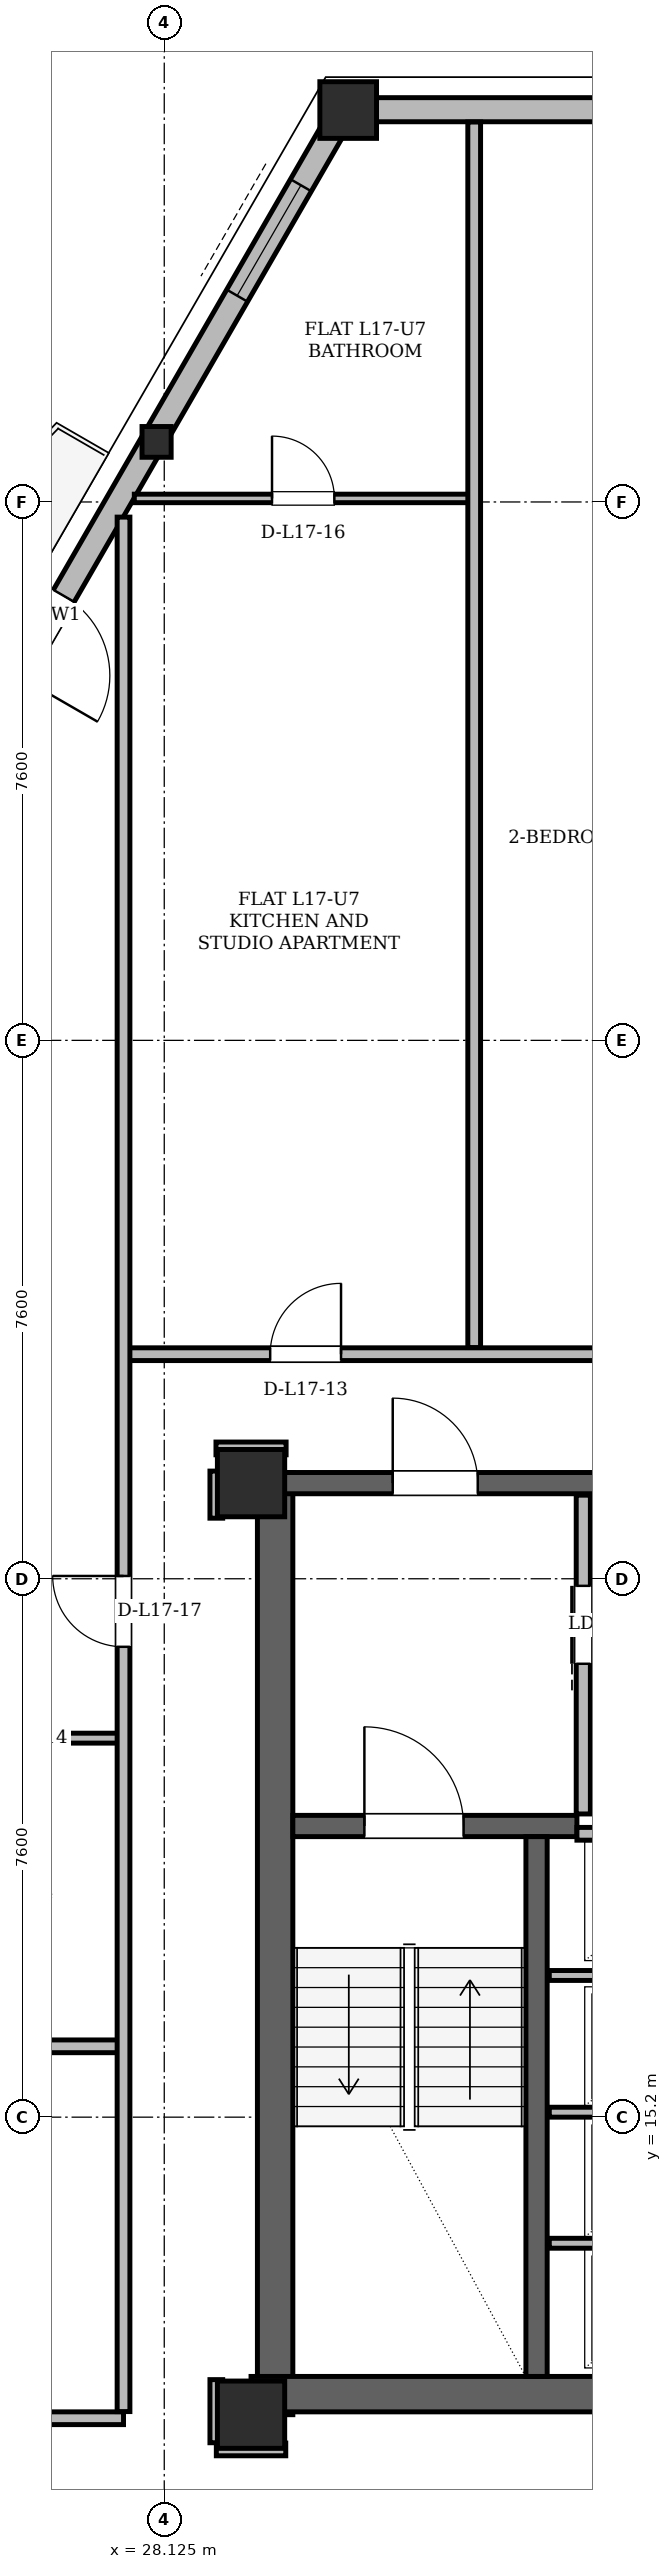
"""IFC4 building model, lengths in metres.
Left out: names, types, materials, properties, quantities, classifications, styles, units other than length and angle.
Written with IfcOpenShell. Run it as: python <this file> out.ifc"""

import sys

from ifc_helpers import new_model, si_unit, direction, frame, frame_2d, origin, origin_2d, place, context, subcontext, project, spatial, rectangle, hollow_rectangle, i_section, extrude, element, fill, save


model = new_model("IFC4")
c1 = context("Model", 3, precision=1e-05, world=origin(), true_north=direction((0.0, 1.0)))
c2 = subcontext(c1, "Body", "Model", "MODEL_VIEW")
j1 = project(units=[si_unit("LENGTHUNIT", "METRE"), si_unit("PLANEANGLEUNIT", "RADIAN")], contexts=[c1])
p1 = place(None, origin())
s1 = spatial("IfcSite", under=j1, at=p1, CompositionType="ELEMENT")
p2 = place(p1, origin())
s2 = spatial("IfcBuilding", under=s1, at=p2, CompositionType="ELEMENT")
p3 = place(p2, frame((0.0, 0.0, 66.9)))
s3 = spatial("IfcBuildingStorey", under=s2, at=p3, CompositionType="ELEMENT", Elevation=66.9)
for number, where, z_axis, x_axis in (
    (1, (29.35, 11.0, 0.0), (0.0, 0.0, 1.0), (1.0, 0.0, 0.0)),
    (2, (29.35, 24.15, 0.0), (0.0, 0.0, 1.0), (1.0, 0.0, 0.0)),
):
    element("IfcColumn", number, at=place(p3, frame(where, z_axis=z_axis, x_axis=x_axis)), inside=s3, PredefinedType="COLUMN", context=c2, shape_type="SweptSolid", body=[
        extrude(hollow_rectangle(XDim=0.95, YDim=0.95, WallThickness=0.08, at=origin_2d()), origin(), (0.0, 0.0, 1.0), 3.6),
    ])
p4 = place(p3, frame((30.669, 43.537, 0.005), z_axis=(0.028949624745, -0.002582360893, 0.999577536082), x_axis=(0.08884909331, 0.996045098687, 0.0)))
e3 = element("IfcColumn", 3, at=p4, inside=s3, PredefinedType="COLUMN", context=c2, shape_type="SweptSolid", body=[
    extrude(hollow_rectangle(XDim=0.8, YDim=0.8, WallThickness=0.065, at=origin_2d()), origin(), (0.0, 0.0, 1.0), 3.593),
])
p5 = place(p3, frame((27.968, 38.859, 0.005), z_axis=(0.026979970064, -0.005980446765, 0.999618084806), x_axis=(0.216409655053, 0.976302648363, 0.0)))
e4 = element("IfcColumn", 4, at=p5, inside=s3, PredefinedType="COLUMN", context=c2, shape_type="SweptSolid", body=[
    extrude(i_section(OverallWidth=0.411, OverallDepth=0.434, WebThickness=0.036, FlangeThickness=0.057, at=origin_2d()), origin(), (0.0, 0.0, 1.0), 3.593),
])
p6 = place(p3, frame((29.69, 11.0, 0.0), z_axis=(0.0, 0.0, 1.0), x_axis=(0.0, 1.0, 0.0)))
e5 = element("IfcWall", 5, at=p6, inside=s3, PredefinedType="SHEAR", context=c2, shape_type="SweptSolid", body=[
    extrude(rectangle(XDim=13.3, YDim=0.5, at=frame_2d((6.65, 0.0))), origin(), (0.0, 0.0, 1.0), 3.36),
])
p7 = place(p3, frame((29.35, 11.29, 0.0), z_axis=(0.0, 0.0, 1.0), x_axis=(1.0, 0.0, 0.0)))
e6 = element("IfcWall", 6, at=p7, inside=s3, PredefinedType="SHEAR", context=c2, shape_type="SweptSolid", body=[
    extrude(rectangle(XDim=7.1, YDim=0.5, at=frame_2d((3.55, 0.0))), origin(), (0.0, 0.0, 1.0), 3.36),
])
p8 = place(p3, frame((29.65, 24.15, 0.0), z_axis=(0.0, 0.0, 1.0), x_axis=(1.0, 0.0, 0.0)))
e7 = element("IfcWall", 7, at=p8, inside=s3, PredefinedType="SHEAR", context=c2, shape_type="SweptSolid", body=[
    extrude(rectangle(XDim=15.7, YDim=0.3, at=frame_2d((7.85, 0.0))), origin(), (0.0, 0.0, 1.0), 3.36),
])
p9 = place(p8, frame((1.7, 0.0, 0.0)))
e8 = element("IfcOpeningElement", 8, at=p9, cuts=e7, PredefinedType="OPENING", context=c2, shape_type="SweptSolid", body=[
    extrude(rectangle(XDim=1.2, YDim=2.2, at=frame_2d((0.6, 1.1))), frame((0.0, 0.15, 0.0), z_axis=(0.0, -1.0, 0.0), x_axis=(1.0, 0.0, 0.0)), (0.0, 0.0, 1.0), 0.3),
])
p10 = place(p8, frame((12.8, 0.0, 0.0)))
e9 = element("IfcOpeningElement", 9, at=p10, cuts=e7, PredefinedType="OPENING", context=c2, shape_type="SweptSolid", body=[
    extrude(rectangle(XDim=1.2, YDim=2.2, at=frame_2d((0.6, 1.1))), frame((0.0, 0.15, 0.0), z_axis=(0.0, -1.0, 0.0), x_axis=(1.0, 0.0, 0.0)), (0.0, 0.0, 1.0), 0.3),
])
p11 = place(p8, frame((6.55, 0.0, 0.0)))
e10 = element("IfcOpeningElement", 10, at=p11, cuts=e7, PredefinedType="OPENING", context=c2, shape_type="SweptSolid", body=[
    extrude(rectangle(XDim=0.9, YDim=2.05, at=frame_2d((0.45, 1.025))), frame((0.0, 0.15, 0.0), z_axis=(0.0, -1.0, 0.0), x_axis=(1.0, 0.0, 0.0)), (0.0, 0.0, 1.0), 0.3),
])
p12 = place(p8, frame((8.45, 0.0, 0.0)))
e11 = element("IfcOpeningElement", 11, at=p12, cuts=e7, PredefinedType="OPENING", context=c2, shape_type="SweptSolid", body=[
    extrude(rectangle(XDim=0.9, YDim=2.05, at=frame_2d((0.45, 1.025))), frame((0.0, 0.15, 0.0), z_axis=(0.0, -1.0, 0.0), x_axis=(1.0, 0.0, 0.0)), (0.0, 0.0, 1.0), 0.3),
])
p13 = place(p3, frame((29.94, 19.31, 0.0), z_axis=(0.0, 0.0, 1.0), x_axis=(1.0, 0.0, 0.0)))
e12 = element("IfcWall", 12, at=p13, inside=s3, PredefinedType="SHEAR", context=c2, shape_type="SweptSolid", body=[
    extrude(rectangle(XDim=4.01, YDim=0.3, at=frame_2d((2.005, 0.0))), origin(), (0.0, 0.0, 1.0), 3.36),
])
p14 = place(p13, frame((1.01, 0.0, 0.0)))
e13 = element("IfcOpeningElement", 13, at=p14, cuts=e12, PredefinedType="OPENING", context=c2, shape_type="SweptSolid", body=[
    extrude(rectangle(XDim=1.4, YDim=2.2, at=frame_2d((0.7, 1.1))), frame((0.0, 0.15, 0.0), z_axis=(0.0, -1.0, 0.0), x_axis=(1.0, 0.0, 0.0)), (0.0, 0.0, 1.0), 0.3),
])
p15 = place(p3, frame((33.38, 11.54, 0.0), z_axis=(0.0, 0.0, 1.0), x_axis=(0.0, 1.0, 0.0)))
e14 = element("IfcWall", 14, at=p15, inside=s3, PredefinedType="SHEAR", context=c2, shape_type="SweptSolid", body=[
    extrude(rectangle(XDim=7.62, YDim=0.3, at=frame_2d((3.81, 0.0))), origin(), (0.0, 0.0, 1.0), 3.36),
])
p16 = place(p3, frame((44.331, 43.537, 0.0), z_axis=(0.0, 0.0, 1.0), x_axis=(-1.0, 0.0, 0.0)))
e15 = element("IfcWall", 15, at=p16, inside=s3, PredefinedType="SOLIDWALL", context=c2, shape_type="SweptSolid", body=[
    extrude(rectangle(XDim=13.662, YDim=0.34, at=frame_2d((6.831, 0.0))), origin(), (0.0, 0.0, 1.0), 2.494),
])
p17 = place(p16, frame((7.788, 0.0, 0.85)))
e16 = element("IfcOpeningElement", 16, at=p17, cuts=e15, PredefinedType="OPENING", context=c2, shape_type="SweptSolid", body=[
    extrude(rectangle(XDim=1.2, YDim=1.48, at=frame_2d((0.6, 0.74))), frame((0.0, 0.17, 0.0), z_axis=(0.0, -1.0, 0.0), x_axis=(1.0, 0.0, 0.0)), (0.0, 0.0, 1.0), 0.34),
])
p18 = place(p3, frame((30.669, 43.537, 0.0), z_axis=(0.0, 0.0, 1.0), x_axis=(-0.499997235847, -0.866026999663, 0.0)))
e17 = element("IfcWall", 17, at=p18, inside=s3, PredefinedType="SOLIDWALL", context=c2, shape_type="SweptSolid", body=[
    extrude(rectangle(XDim=33.763, YDim=0.34, at=frame_2d((16.882, 0.0))), origin(), (0.0, 0.0, 1.0), 2.494),
])
p19 = place(p18, frame((7.924, 0.0, 0.0)))
e18 = element("IfcOpeningElement", 18, at=p19, cuts=e17, PredefinedType="OPENING", context=c2, shape_type="SweptSolid", body=[
    extrude(rectangle(XDim=1.3, YDim=2.2, at=frame_2d((0.65, 1.1))), frame((0.0, 0.17, 0.0), z_axis=(0.0, -1.0, 0.0), x_axis=(1.0, 0.0, 0.0)), (0.0, 0.0, 1.0), 0.34),
])
p20 = place(p18, frame((29.254, 0.0, 0.0)))
e19 = element("IfcOpeningElement", 19, at=p20, cuts=e17, PredefinedType="OPENING", context=c2, shape_type="SweptSolid", body=[
    extrude(rectangle(XDim=1.5, YDim=2.2, at=frame_2d((0.75, 1.1))), frame((0.0, 0.17, 0.0), z_axis=(0.0, -1.0, 0.0), x_axis=(1.0, 0.0, 0.0)), (0.0, 0.0, 1.0), 0.34),
])
p21 = place(p18, frame((12.199, 0.0, 0.85)))
e20 = element("IfcOpeningElement", 20, at=p21, cuts=e17, PredefinedType="OPENING", context=c2, shape_type="SweptSolid", body=[
    extrude(rectangle(XDim=1.8, YDim=1.534, at=frame_2d((0.9, 0.767))), frame((0.0, 0.17, 0.0), z_axis=(0.0, -1.0, 0.0), x_axis=(1.0, 0.0, 0.0)), (0.0, 0.0, 1.0), 0.34),
])
p22 = place(p18, frame((19.181, 0.0, 0.85)))
e21 = element("IfcOpeningElement", 21, at=p22, cuts=e17, PredefinedType="OPENING", context=c2, shape_type="SweptSolid", body=[
    extrude(rectangle(XDim=1.2, YDim=1.48, at=frame_2d((0.6, 0.74))), frame((0.0, 0.17, 0.0), z_axis=(0.0, -1.0, 0.0), x_axis=(1.0, 0.0, 0.0)), (0.0, 0.0, 1.0), 0.34),
])
p23 = place(p18, frame((1.231, 0.0, 0.85)))
e22 = element("IfcOpeningElement", 22, at=p23, cuts=e17, PredefinedType="OPENING", context=c2, shape_type="SweptSolid", body=[
    extrude(rectangle(XDim=1.8, YDim=1.534, at=frame_2d((0.9, 0.767))), frame((0.0, 0.17, 0.0), z_axis=(0.0, -1.0, 0.0), x_axis=(1.0, 0.0, 0.0)), (0.0, 0.0, 1.0), 0.34),
])
p24 = place(p3, frame((34.04, 19.48, 0.0), z_axis=(0.0, 0.0, 1.0), x_axis=(0.0, 1.0, 0.0)))
e23 = element("IfcWall", 23, at=p24, inside=s3, PredefinedType="PARTITIONING", context=c2, shape_type="SweptSolid", body=[
    extrude(rectangle(XDim=4.5, YDim=0.2, at=frame_2d((2.25, 0.0))), origin(), (0.0, 0.0, 1.0), 2.4),
])
p25 = place(p24, frame((2.12, 0.0, 0.0)))
e24 = element("IfcOpeningElement", 24, at=p25, cuts=e23, PredefinedType="OPENING", context=c2, shape_type="SweptSolid", body=[
    extrude(rectangle(XDim=1.1, YDim=2.2, at=frame_2d((0.55, 1.1))), frame((0.0, 0.1, 0.0), z_axis=(0.0, -1.0, 0.0), x_axis=(1.0, 0.0, 0.0)), (0.0, 0.0, 1.0), 0.2),
])
p26 = place(p3, frame((34.16, 20.86, 0.0), z_axis=(0.0, 0.0, 1.0), x_axis=(1.0, 0.0, 0.0)))
e25 = element("IfcWall", 25, at=p26, inside=s3, PredefinedType="PARTITIONING", context=c2, shape_type="SweptSolid", body=[
    extrude(rectangle(XDim=1.58, YDim=0.18, at=frame_2d((0.79, 0.0))), origin(), (0.0, 0.0, 1.0), 3.36),
])
p27 = place(p3, frame((33.95, 19.2, 0.0), z_axis=(0.0, 0.0, 1.0), x_axis=(1.0, 0.0, 0.0)))
e26 = element("IfcWall", 26, at=p27, inside=s3, PredefinedType="PARTITIONING", context=c2, shape_type="SweptSolid", body=[
    extrude(rectangle(XDim=2.27, YDim=0.18, at=frame_2d((1.135, 0.0))), origin(), (0.0, 0.0, 1.0), 3.36),
])
for number, where, z_axis, x_axis in (
    (27, (33.56, 13.42, 0.0), (0.0, 0.0, 1.0), (1.0, 0.0, 0.0)),
    (28, (33.56, 15.27, 0.0), (0.0, 0.0, 1.0), (1.0, 0.0, 0.0)),
    (29, (33.56, 17.2, 0.0), (0.0, 0.0, 1.0), (1.0, 0.0, 0.0)),
):
    element("IfcWall", number, at=place(p3, frame(where, z_axis=z_axis, x_axis=x_axis)), inside=s3, PredefinedType="PARTITIONING", context=c2, shape_type="SweptSolid", body=[
        extrude(rectangle(XDim=2.66, YDim=0.14, at=frame_2d((1.33, 0.0))), origin(), (0.0, 0.0, 1.0), 3.36),
    ])
p28 = place(p3, frame((28.86, 10.51, 0.0), z_axis=(0.0, 0.0, 1.0), x_axis=(1.0, 0.0, 0.0)))
e30 = element("IfcWall", 30, at=p28, inside=s3, PredefinedType="PARTITIONING", context=c2, shape_type="SweptSolid", body=[
    extrude(rectangle(XDim=0.98, YDim=0.18, at=frame_2d((0.49, 0.0))), origin(), (0.0, 0.0, 1.0), 2.738),
])
p29 = place(p3, frame((19.2, 10.95, 0.0), z_axis=(0.0, 0.0, 1.0), x_axis=(1.0, 0.0, 0.0)))
e31 = element("IfcWall", 31, at=p29, inside=s3, PredefinedType="PARTITIONING", context=c2, shape_type="SweptSolid", body=[
    extrude(rectangle(XDim=8.35, YDim=0.18, at=frame_2d((4.175, 0.0))), origin(), (0.0, 0.0, 1.0), 3.36),
])
p30 = place(p3, frame((15.087, 16.2, 0.0), z_axis=(0.0, 0.0, 1.0), x_axis=(1.0, 0.0, 0.0)))
e32 = element("IfcWall", 32, at=p30, inside=s3, PredefinedType="PARTITIONING", context=c2, shape_type="SweptSolid", body=[
    extrude(rectangle(XDim=12.463, YDim=0.18, at=frame_2d((6.231, 0.0))), origin(), (0.0, 0.0, 1.0), 2.946),
])
p31 = place(p3, frame((17.599, 20.55, 0.0), z_axis=(0.0, 0.0, 1.0), x_axis=(1.0, 0.0, 0.0)))
e33 = element("IfcWall", 33, at=p31, inside=s3, PredefinedType="PARTITIONING", context=c2, shape_type="SweptSolid", body=[
    extrude(rectangle(XDim=10.001, YDim=0.14, at=frame_2d((5.001, 0.0))), origin(), (0.0, 0.0, 1.0), 3.36),
])
p32 = place(p31, frame((0.462, 0.0, 0.0)))
e34 = element("IfcOpeningElement", 34, at=p32, cuts=e33, PredefinedType="OPENING", context=c2, shape_type="SweptSolid", body=[
    extrude(rectangle(XDim=0.88, YDim=2.08, at=frame_2d((0.44, 1.04))), frame((0.0, 0.07, 0.0), z_axis=(0.0, -1.0, 0.0), x_axis=(1.0, 0.0, 0.0)), (0.0, 0.0, 1.0), 0.14),
])
p33 = place(p31, frame((2.412, 0.0, 0.0)))
e35 = element("IfcOpeningElement", 35, at=p33, cuts=e33, PredefinedType="OPENING", context=c2, shape_type="SweptSolid", body=[
    extrude(rectangle(XDim=0.95, YDim=2.1, at=frame_2d((0.475, 1.05))), frame((0.0, 0.07, 0.0), z_axis=(0.0, -1.0, 0.0), x_axis=(1.0, 0.0, 0.0)), (0.0, 0.0, 1.0), 0.14),
])
p34 = place(p31, frame((6.487, 0.0, 0.0)))
e36 = element("IfcOpeningElement", 36, at=p34, cuts=e33, PredefinedType="OPENING", context=c2, shape_type="SweptSolid", body=[
    extrude(rectangle(XDim=0.92, YDim=2.12, at=frame_2d((0.46, 1.06))), frame((0.0, 0.07, 0.0), z_axis=(0.0, -1.0, 0.0), x_axis=(1.0, 0.0, 0.0)), (0.0, 0.0, 1.0), 0.14),
])
p35 = place(p3, frame((28.855, 24.64, 0.0), z_axis=(0.0, 0.0, 1.0), x_axis=(1.0, 0.0, 0.0)))
e37 = element("IfcWall", 37, at=p35, inside=s3, PredefinedType="PARTITIONING", context=c2, shape_type="SweptSolid", body=[
    extrude(rectangle(XDim=0.99, YDim=0.18, at=frame_2d((0.495, 0.0))), origin(), (0.0, 0.0, 1.0), 2.738),
])
p36 = place(p3, frame((27.55, 25.97, 0.0), z_axis=(0.0, 0.0, 1.0), x_axis=(1.0, 0.0, 0.0)))
e38 = element("IfcWall", 38, at=p36, inside=s3, PredefinedType="PARTITIONING", context=c2, shape_type="SweptSolid", body=[
    extrude(rectangle(XDim=19.9, YDim=0.18, at=frame_2d((9.95, 0.0))), origin(), (0.0, 0.0, 1.0), 2.738),
])
p37 = place(p36, frame((2.07, 0.0, 0.0)))
e39 = element("IfcOpeningElement", 39, at=p37, cuts=e38, PredefinedType="OPENING", context=c2, shape_type="SweptSolid", body=[
    extrude(rectangle(XDim=1.0, YDim=2.18, at=frame_2d((0.5, 1.09))), frame((0.0, 0.09, 0.0), z_axis=(0.0, -1.0, 0.0), x_axis=(1.0, 0.0, 0.0)), (0.0, 0.0, 1.0), 0.18),
])
p38 = place(p36, frame((7.851, 0.0, 0.0)))
e40 = element("IfcOpeningElement", 40, at=p38, cuts=e38, PredefinedType="OPENING", context=c2, shape_type="SweptSolid", body=[
    extrude(rectangle(XDim=1.0, YDim=2.18, at=frame_2d((0.5, 1.09))), frame((0.0, 0.09, 0.0), z_axis=(0.0, -1.0, 0.0), x_axis=(1.0, 0.0, 0.0)), (0.0, 0.0, 1.0), 0.18),
])
p39 = place(p36, frame((16.916, 0.0, 0.0)))
e41 = element("IfcOpeningElement", 41, at=p39, cuts=e38, PredefinedType="OPENING", context=c2, shape_type="SweptSolid", body=[
    extrude(rectangle(XDim=1.0, YDim=2.18, at=frame_2d((0.5, 1.09))), frame((0.0, 0.09, 0.0), z_axis=(0.0, -1.0, 0.0), x_axis=(1.0, 0.0, 0.0)), (0.0, 0.0, 1.0), 0.18),
])
p40 = place(p3, frame((27.702, 38.05, 0.0), z_axis=(0.0, 0.0, 1.0), x_axis=(1.0, 0.0, 0.0)))
e42 = element("IfcWall", 42, at=p40, inside=s3, PredefinedType="PARTITIONING", context=c2, shape_type="SweptSolid", body=[
    extrude(rectangle(XDim=4.88, YDim=0.12, at=frame_2d((2.44, 0.0))), origin(), (0.0, 0.0, 1.0), 2.738),
])
p41 = place(p40, frame((1.944, 0.0, 0.0)))
e43 = element("IfcOpeningElement", 43, at=p41, cuts=e42, PredefinedType="OPENING", context=c2, shape_type="SweptSolid", body=[
    extrude(rectangle(XDim=0.88, YDim=2.08, at=frame_2d((0.44, 1.04))), frame((0.0, 0.06, 0.0), z_axis=(0.0, -1.0, 0.0), x_axis=(1.0, 0.0, 0.0)), (0.0, 0.0, 1.0), 0.12),
])
p42 = place(p3, frame((27.55, 11.044, 0.0), z_axis=(0.0, 0.0, 1.0), x_axis=(0.0, 1.0, 0.0)))
e44 = element("IfcWall", 44, at=p42, inside=s3, PredefinedType="PARTITIONING", context=c2, shape_type="SweptSolid", body=[
    extrude(rectangle(XDim=26.742, YDim=0.18, at=frame_2d((13.371, 0.0))), origin(), (0.0, 0.0, 1.0), 2.494),
])
p43 = place(p42, frame((10.795, 0.0, 0.0)))
e45 = element("IfcOpeningElement", 45, at=p43, cuts=e44, PredefinedType="OPENING", context=c2, shape_type="SweptSolid", body=[
    extrude(rectangle(XDim=1.0, YDim=2.18, at=frame_2d((0.5, 1.09))), frame((0.0, 0.09, 0.0), z_axis=(0.0, -1.0, 0.0), x_axis=(1.0, 0.0, 0.0)), (0.0, 0.0, 1.0), 0.18),
])
p44 = place(p3, frame((28.86, 10.604, 0.0), z_axis=(0.0, 0.0, 1.0), x_axis=(0.0, 1.0, 0.0)))
e46 = element("IfcWall", 46, at=p44, inside=s3, PredefinedType="PARTITIONING", context=c2, shape_type="SweptSolid", body=[
    extrude(rectangle(XDim=0.891, YDim=0.18, at=frame_2d((0.446, 0.0))), origin(), (0.0, 0.0, 1.0), 2.738),
])
p45 = place(p3, frame((28.86, 23.655, 0.0), z_axis=(0.0, 0.0, 1.0), x_axis=(0.0, 1.0, 0.0)))
e47 = element("IfcWall", 47, at=p45, inside=s3, PredefinedType="PARTITIONING", context=c2, shape_type="SweptSolid", body=[
    extrude(rectangle(XDim=0.665, YDim=0.18, at=frame_2d((0.333, 0.0))), origin(), (0.0, 0.0, 1.0), 2.946),
])
p46 = place(p3, frame((32.5, 26.064, 0.0), z_axis=(0.0, 0.0, 1.0), x_axis=(0.0, 1.0, 0.0)))
e48 = element("IfcWall", 48, at=p46, inside=s3, PredefinedType="PARTITIONING", context=c2, shape_type="SweptSolid", body=[
    extrude(rectangle(XDim=17.299, YDim=0.18, at=frame_2d((8.649, 0.0))), origin(), (0.0, 0.0, 1.0), 3.36),
])
p47 = place(p19, origin())
e49 = element("IfcDoor", 49, at=p47, inside=s3, OperationType="SINGLE_SWING_RIGHT", PredefinedType="DOOR", context=c2, shape_type="SweptSolid", body=[
    extrude(rectangle(XDim=1.3, YDim=2.2, at=frame_2d((0.65, 1.1))), frame((0.0, 0.025, 0.0), z_axis=(0.0, -1.0, 0.0), x_axis=(1.0, 0.0, 0.0)), (0.0, 0.0, 1.0), 0.05),
])
fill(e18, e49)
p48 = place(p23, origin())
e50 = element("IfcWindow", 50, at=p48, inside=s3, PartitioningType="SINGLE_PANEL", PredefinedType="WINDOW", context=c2, shape_type="SweptSolid", body=[
    extrude(rectangle(XDim=1.8, YDim=1.534, at=frame_2d((0.9, 0.767))), frame((0.0, 0.03, 0.0), z_axis=(0.0, -1.0, 0.0), x_axis=(1.0, 0.0, 0.0)), (0.0, 0.0, 1.0), 0.06),
])
fill(e22, e50)
p49 = place(p25, origin())
e51 = element("IfcDoor", 51, at=p49, inside=s3, OperationType="SLIDING_TO_LEFT", PredefinedType="DOOR", context=c2, shape_type="SweptSolid", body=[
    extrude(rectangle(XDim=1.1, YDim=2.2, at=frame_2d((0.55, 1.1))), frame((0.0, 0.025, 0.0), z_axis=(0.0, -1.0, 0.0), x_axis=(1.0, 0.0, 0.0)), (0.0, 0.0, 1.0), 0.05),
])
fill(e24, e51)
p50 = place(p14, origin())
e52 = element("IfcDoor", 52, at=p50, inside=s3, OperationType="SINGLE_SWING_LEFT", PredefinedType="DOOR", context=c2, shape_type="SweptSolid", body=[
    extrude(rectangle(XDim=1.4, YDim=2.2, at=frame_2d((0.7, 1.1))), frame((0.0, 0.025, 0.0), z_axis=(0.0, -1.0, 0.0), x_axis=(1.0, 0.0, 0.0)), (0.0, 0.0, 1.0), 0.05),
])
fill(e13, e52)
p51 = place(p9, origin())
e53 = element("IfcDoor", 53, at=p51, inside=s3, OperationType="SINGLE_SWING_LEFT", PredefinedType="DOOR", context=c2, shape_type="SweptSolid", body=[
    extrude(rectangle(XDim=1.2, YDim=2.2, at=frame_2d((0.6, 1.1))), frame((0.0, 0.025, 0.0), z_axis=(0.0, -1.0, 0.0), x_axis=(1.0, 0.0, 0.0)), (0.0, 0.0, 1.0), 0.05),
])
fill(e8, e53)
p52 = place(p37, origin())
e54 = element("IfcDoor", 54, at=p52, inside=s3, OperationType="SINGLE_SWING_RIGHT", PredefinedType="DOOR", context=c2, shape_type="SweptSolid", body=[
    extrude(rectangle(XDim=1.0, YDim=2.18, at=frame_2d((0.5, 1.09))), frame((0.0, 0.025, 0.0), z_axis=(0.0, -1.0, 0.0), x_axis=(1.0, 0.0, 0.0)), (0.0, 0.0, 1.0), 0.05),
])
fill(e39, e54)
p53 = place(p41, origin())
e55 = element("IfcDoor", 55, at=p53, inside=s3, OperationType="SINGLE_SWING_LEFT", PredefinedType="DOOR", context=c2, shape_type="SweptSolid", body=[
    extrude(rectangle(XDim=0.88, YDim=2.08, at=frame_2d((0.44, 1.04))), frame((0.0, 0.025, 0.0), z_axis=(0.0, -1.0, 0.0), x_axis=(1.0, 0.0, 0.0)), (0.0, 0.0, 1.0), 0.05),
])
fill(e43, e55)
p54 = place(p43, origin())
e56 = element("IfcDoor", 56, at=p54, inside=s3, OperationType="SINGLE_SWING_RIGHT", PredefinedType="DOOR", context=c2, shape_type="SweptSolid", body=[
    extrude(rectangle(XDim=1.0, YDim=2.18, at=frame_2d((0.5, 1.09))), frame((0.0, 0.025, 0.0), z_axis=(0.0, -1.0, 0.0), x_axis=(1.0, 0.0, 0.0)), (0.0, 0.0, 1.0), 0.05),
])
fill(e45, e56)
save(model, sys.argv[1])
